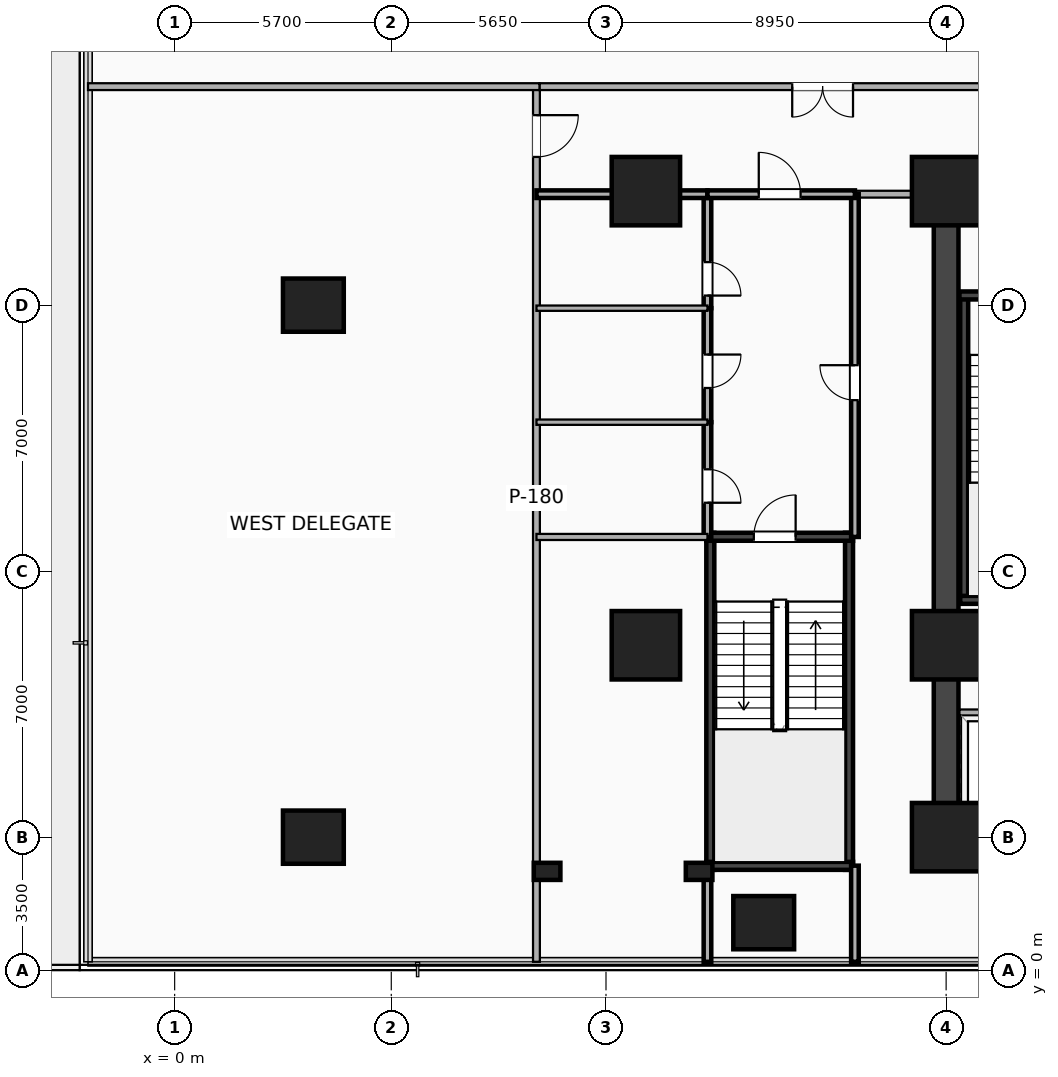
"""IFC4 building model, lengths in metres.
Left out: names, types, materials, properties, quantities, classifications, styles, units other than length and angle.
Written with IfcOpenShell. Run it as: python <this file> out.ifc"""

import sys

from ifc_helpers import new_model, si_unit, direction, frame, frame_2d, origin, origin_2d, place, context, subcontext, project, spatial, rectangle, extrude, element, fill, save


model = new_model("IFC4")
c1 = context("Model", 3, precision=1e-05, world=origin(), true_north=direction((0.0, 1.0)))
c2 = subcontext(c1, "Body", "Model", "MODEL_VIEW")
j1 = project(units=[si_unit("LENGTHUNIT", "METRE"), si_unit("PLANEANGLEUNIT", "RADIAN")], contexts=[c1])
p1 = place(None, origin())
s1 = spatial("IfcSite", under=j1, at=p1, CompositionType="ELEMENT")
p2 = place(p1, origin())
s2 = spatial("IfcBuilding", under=s1, at=p2, CompositionType="ELEMENT")
p3 = place(p2, frame((0.0, 0.0, 5.4)))
s3 = spatial("IfcBuildingStorey", under=s2, at=p3, CompositionType="ELEMENT", Elevation=5.4)
p4 = place(p3, frame((20.3, 3.63, 0.0), z_axis=(0.0, 0.0, 1.0), x_axis=(1.0, 0.0, 0.0)))
e1 = element("IfcWall", 1, at=p4, inside=s3, PredefinedType="SHEAR", context=c2, shape_type="SweptSolid", body=[
    extrude(rectangle(XDim=24.5, YDim=0.65, at=frame_2d((12.25, 0.0))), origin(), (0.0, 0.0, 1.0), 4.3),
])
p5 = place(p3, frame((20.3, 3.5, 0.0), z_axis=(0.0, 0.0, 1.0), x_axis=(0.0, 1.0, 0.0)))
e2 = element("IfcWall", 2, at=p5, inside=s3, PredefinedType="SHEAR", context=c2, shape_type="SweptSolid", body=[
    extrude(rectangle(XDim=16.9, YDim=0.65, at=frame_2d((8.45, 0.0))), origin(), (0.0, 0.0, 1.0), 4.3),
])
p6 = place(p3, frame((20.775, 9.745, 0.0), z_axis=(0.0, 0.0, 1.0), x_axis=(0.0, 1.0, 0.0)))
e3 = element("IfcWall", 3, at=p6, inside=s3, PredefinedType="SHEAR", context=c2, shape_type="SweptSolid", body=[
    extrude(rectangle(XDim=8.01, YDim=0.21, at=frame_2d((4.005, 0.0))), origin(), (0.0, 0.0, 1.0), 4.3),
])
p7 = place(p3, frame((20.67, 9.745, 0.0), z_axis=(0.0, 0.0, 1.0), x_axis=(1.0, 0.0, 0.0)))
e4 = element("IfcWall", 4, at=p7, inside=s3, PredefinedType="SHEAR", context=c2, shape_type="SweptSolid", body=[
    extrude(rectangle(XDim=3.66, YDim=0.21, at=frame_2d((1.83, 0.0))), origin(), (0.0, 0.0, 1.0), 4.3),
])
p8 = place(p3, frame((20.65, 17.755, 0.0), z_axis=(0.0, 0.0, 1.0), x_axis=(1.0, 0.0, 0.0)))
e5 = element("IfcWall", 5, at=p8, inside=s3, PredefinedType="SHEAR", context=c2, shape_type="SweptSolid", body=[
    extrude(rectangle(XDim=8.3, YDim=0.21, at=frame_2d((4.15, 0.0))), origin(), (0.0, 0.0, 1.0), 4.3),
])
p9 = place(p8, frame((2.2, 0.0, 0.0), z_axis=(0.0, 0.0, 1.0), x_axis=(-1.0, 0.0, 0.0)))
e6 = element("IfcOpeningElement", 6, at=p9, cuts=e5, PredefinedType="OPENING", context=c2, shape_type="SweptSolid", body=[
    extrude(rectangle(XDim=1.05, YDim=2.15, at=frame_2d((0.525, 1.075))), frame((0.0, 0.115, 0.0), z_axis=(0.0, -1.0, 0.0), x_axis=(1.0, 0.0, 0.0)), (0.0, 0.0, 1.0), 0.23),
])
p10 = place(p8, frame((4.15, 0.0, 0.0)))
e7 = element("IfcOpeningElement", 7, at=p10, cuts=e5, PredefinedType="OPENING", context=c2, shape_type="SweptSolid", body=[
    extrude(rectangle(XDim=1.1, YDim=2.18, at=frame_2d((0.55, 1.09))), frame((0.0, 0.115, 0.0), z_axis=(0.0, -1.0, 0.0), x_axis=(1.0, 0.0, 0.0)), (0.0, 0.0, 1.0), 0.23),
])
p11 = place(p8, frame((6.45, 0.0, 0.0)))
e8 = element("IfcOpeningElement", 8, at=p11, cuts=e5, PredefinedType="OPENING", context=c2, shape_type="SweptSolid", body=[
    extrude(rectangle(XDim=1.12, YDim=2.2, at=frame_2d((0.56, 1.1))), frame((0.0, 0.115, 0.0), z_axis=(0.0, -1.0, 0.0), x_axis=(1.0, 0.0, 0.0)), (0.0, 0.0, 1.0), 0.23),
])
for number, where, z_axis, x_axis in (
    (9, (14.095, 2.64, 0.0), (0.0, 0.0, 1.0), (0.0, 1.0, 0.0)),
    (10, (17.745, 2.64, 0.0), (0.0, 0.0, 1.0), (0.0, 1.0, 0.0)),
):
    element("IfcWall", number, at=place(p3, frame(where, z_axis=z_axis, x_axis=x_axis)), inside=s3, PredefinedType="SHEAR", context=c2, shape_type="SweptSolid", body=[
        extrude(rectangle(XDim=8.87, YDim=0.21, at=frame_2d((4.435, 0.0))), origin(), (0.0, 0.0, 1.0), 4.3),
    ])
p12 = place(p3, frame((13.99, 2.745, 0.0), z_axis=(0.0, 0.0, 1.0), x_axis=(1.0, 0.0, 0.0)))
e11 = element("IfcWall", 11, at=p12, inside=s3, PredefinedType="SHEAR", context=c2, shape_type="SweptSolid", body=[
    extrude(rectangle(XDim=3.86, YDim=0.21, at=frame_2d((1.93, 0.0))), origin(), (0.0, 0.0, 1.0), 4.3),
])
p13 = place(p3, frame((13.99, 11.405, 0.0), z_axis=(0.0, 0.0, 1.0), x_axis=(1.0, 0.0, 0.0)))
e12 = element("IfcWall", 12, at=p13, inside=s3, PredefinedType="SHEAR", context=c2, shape_type="SweptSolid", body=[
    extrude(rectangle(XDim=3.86, YDim=0.21, at=frame_2d((1.93, 0.0))), origin(), (0.0, 0.0, 1.0), 4.3),
])
p14 = place(p13, frame((2.35, 0.0, 0.0), z_axis=(0.0, 0.0, 1.0), x_axis=(-1.0, 0.0, 0.0)))
e13 = element("IfcOpeningElement", 13, at=p14, cuts=e12, PredefinedType="OPENING", context=c2, shape_type="SweptSolid", body=[
    extrude(rectangle(XDim=1.1, YDim=2.15, at=frame_2d((0.55, 1.075))), frame((0.0, 0.115, 0.0), z_axis=(0.0, -1.0, 0.0), x_axis=(1.0, 0.0, 0.0)), (0.0, 0.0, 1.0), 0.23),
])
for number, where, z_axis, x_axis in (
    (14, (9.8, 2.6, -0.3), (0.0, 0.0, 1.0), (1.0, 0.0, 0.0)),
    (15, (13.8, 2.6, -0.3), (0.0, 0.0, 1.0), (1.0, 0.0, 0.0)),
):
    element("IfcColumn", number, at=place(p3, frame(where, z_axis=z_axis, x_axis=x_axis)), inside=s3, PredefinedType="PILASTER", context=c2, shape_type="SweptSolid", body=[
        extrude(rectangle(XDim=0.7, YDim=0.45, at=origin_2d()), origin(), (0.0, 0.0, 1.0), 4.6),
    ])
for number, where, z_axis, x_axis in (
    (16, (20.3, 3.5, -0.3), (0.0, 0.0, 1.0), (1.0, 0.0, 0.0)),
    (17, (20.3, 8.55, -0.3), (0.0, 0.0, 1.0), (1.0, 0.0, 0.0)),
    (18, (20.3, 20.5, -0.3), (0.0, 0.0, 1.0), (1.0, 0.0, 0.0)),
    (19, (12.4, 8.55, -0.3), (0.0, 0.0, 1.0), (1.0, 0.0, 0.0)),
    (20, (12.4, 20.5, -0.3), (0.0, 0.0, 1.0), (1.0, 0.0, 0.0)),
):
    element("IfcColumn", number, at=place(p3, frame(where, z_axis=z_axis, x_axis=x_axis)), inside=s3, PredefinedType="COLUMN", context=c2, shape_type="SweptSolid", body=[
        extrude(rectangle(XDim=1.8, YDim=1.8, at=origin_2d()), origin(), (0.0, 0.0, 1.0), 4.6),
    ])
for number, where, z_axis, x_axis in (
    (21, (3.65, 3.5, -0.3), (0.0, 0.0, 1.0), (1.0, 0.0, 0.0)),
    (22, (3.65, 17.5, -0.3), (0.0, 0.0, 1.0), (1.0, 0.0, 0.0)),
    (23, (15.5, 1.25, -0.3), (0.0, 0.0, 1.0), (1.0, 0.0, 0.0)),
):
    element("IfcColumn", number, at=place(p3, frame(where, z_axis=z_axis, x_axis=x_axis)), inside=s3, PredefinedType="COLUMN", context=c2, shape_type="SweptSolid", body=[
        extrude(rectangle(XDim=1.6, YDim=1.4, at=origin_2d()), origin(), (0.0, 0.0, 1.0), 4.6),
    ])
p15 = place(p3, frame((20.65, 20.42, 0.0), z_axis=(0.0, 0.0, 1.0), x_axis=(1.0, 0.0, 0.0)))
e24 = element("IfcWall", 24, at=p15, inside=s3, PredefinedType="PARTITIONING", context=c2, shape_type="SweptSolid", body=[
    extrude(rectangle(XDim=5.73, YDim=0.2, at=frame_2d((2.865, 0.0))), origin(), (0.0, 0.0, 1.0), 2.635),
])
p16 = place(p15, frame((2.3, 0.0, 0.0)))
e25 = element("IfcOpeningElement", 25, at=p16, cuts=e24, PredefinedType="OPENING", context=c2, shape_type="SweptSolid", body=[
    extrude(rectangle(XDim=1.1, YDim=2.15, at=frame_2d((0.55, 1.075))), frame((0.0, 0.11, 0.0), z_axis=(0.0, -1.0, 0.0), x_axis=(1.0, 0.0, 0.0)), (0.0, 0.0, 1.0), 0.22),
])
p17 = place(p3, frame((20.65, 6.78, 0.0), z_axis=(0.0, 0.0, 1.0), x_axis=(1.0, 0.0, 0.0)))
e26 = element("IfcWall", 26, at=p17, inside=s3, PredefinedType="PARTITIONING", context=c2, shape_type="SweptSolid", body=[
    extrude(rectangle(XDim=8.3, YDim=0.16, at=frame_2d((4.15, 0.0))), origin(), (0.0, 0.0, 1.0), 3.43),
])
p18 = place(p17, frame((3.695, 0.0, 0.0)))
e27 = element("IfcOpeningElement", 27, at=p18, cuts=e26, PredefinedType="OPENING", context=c2, shape_type="SweptSolid", body=[
    extrude(rectangle(XDim=1.15, YDim=2.2, at=frame_2d((0.575, 1.1))), frame((0.0, 0.09, 0.0), z_axis=(0.0, -1.0, 0.0), x_axis=(1.0, 0.0, 0.0)), (0.0, 0.0, 1.0), 0.18),
])
p19 = place(p17, frame((5.492, 0.0, 0.0)))
e28 = element("IfcOpeningElement", 28, at=p19, cuts=e26, PredefinedType="OPENING", context=c2, shape_type="SweptSolid", body=[
    extrude(rectangle(XDim=1.15, YDim=2.2, at=frame_2d((0.575, 1.1))), frame((0.0, 0.09, 0.0), z_axis=(0.0, -1.0, 0.0), x_axis=(1.0, 0.0, 0.0)), (0.0, 0.0, 1.0), 0.18),
])
p20 = place(p17, frame((1.059, 0.0, 0.0)))
e29 = element("IfcOpeningElement", 29, at=p20, cuts=e26, PredefinedType="OPENING", context=c2, shape_type="SweptSolid", body=[
    extrude(rectangle(XDim=1.15, YDim=2.2, at=frame_2d((0.575, 1.1))), frame((0.0, 0.09, 0.0), z_axis=(0.0, -1.0, 0.0), x_axis=(1.0, 0.0, 0.0)), (0.0, 0.0, 1.0), 0.18),
])
p21 = place(p3, frame((17.9, 20.42, 0.0), z_axis=(0.0, 0.0, 1.0), x_axis=(1.0, 0.0, 0.0)))
e30 = element("IfcWall", 30, at=p21, inside=s3, PredefinedType="PARTITIONING", context=c2, shape_type="SweptSolid", body=[
    extrude(rectangle(XDim=2.4, YDim=0.18, at=frame_2d((1.2, 0.0))), origin(), (0.0, 0.0, 1.0), 2.635),
])
p22 = place(p3, frame((9.52, 0.22, 0.0), z_axis=(0.0, 0.0, 1.0), x_axis=(0.0, 1.0, 0.0)))
e31 = element("IfcWall", 31, at=p22, inside=s3, PredefinedType="PARTITIONING", context=c2, shape_type="SweptSolid", body=[
    extrude(rectangle(XDim=23.03, YDim=0.18, at=frame_2d((11.515, 0.0))), origin(), (0.0, 0.0, 1.0), 4.3),
])
p23 = place(p22, frame((21.18, 0.0, 0.0)))
e32 = element("IfcOpeningElement", 32, at=p23, cuts=e31, PredefinedType="OPENING", context=c2, shape_type="SweptSolid", body=[
    extrude(rectangle(XDim=1.1, YDim=2.15, at=frame_2d((0.55, 1.075))), frame((0.0, 0.1, 0.0), z_axis=(0.0, -1.0, 0.0), x_axis=(1.0, 0.0, 0.0)), (0.0, 0.0, 1.0), 0.2),
])
p24 = place(p3, frame((14.02, 11.4, 0.0), z_axis=(0.0, 0.0, 1.0), x_axis=(0.0, 1.0, 0.0)))
e33 = element("IfcWall", 33, at=p24, inside=s3, PredefinedType="PARTITIONING", context=c2, shape_type="SweptSolid", body=[
    extrude(rectangle(XDim=3.02, YDim=0.2, at=frame_2d((1.51, 0.0))), origin(), (0.0, 0.0, 1.0), 4.3),
])
p25 = place(p24, frame((0.9, 0.0, 0.0)))
e34 = element("IfcOpeningElement", 34, at=p25, cuts=e33, PredefinedType="OPENING", context=c2, shape_type="SweptSolid", body=[
    extrude(rectangle(XDim=0.88, YDim=2.08, at=frame_2d((0.44, 1.04))), frame((0.0, 0.11, 0.0), z_axis=(0.0, -1.0, 0.0), x_axis=(1.0, 0.0, 0.0)), (0.0, 0.0, 1.0), 0.22),
])
p26 = place(p3, frame((14.02, 14.42, 0.0), z_axis=(0.0, 0.0, 1.0), x_axis=(0.0, 1.0, 0.0)))
e35 = element("IfcWall", 35, at=p26, inside=s3, PredefinedType="PARTITIONING", context=c2, shape_type="SweptSolid", body=[
    extrude(rectangle(XDim=3.0, YDim=0.2, at=frame_2d((1.5, 0.0))), origin(), (0.0, 0.0, 1.0), 4.3),
])
p27 = place(p26, frame((0.9, 0.0, 0.0)))
e36 = element("IfcOpeningElement", 36, at=p27, cuts=e35, PredefinedType="OPENING", context=c2, shape_type="SweptSolid", body=[
    extrude(rectangle(XDim=0.88, YDim=2.08, at=frame_2d((0.44, 1.04))), frame((0.0, 0.11, 0.0), z_axis=(0.0, -1.0, 0.0), x_axis=(1.0, 0.0, 0.0)), (0.0, 0.0, 1.0), 0.22),
])
p28 = place(p3, frame((14.02, 17.42, 0.0), z_axis=(0.0, 0.0, 1.0), x_axis=(0.0, 1.0, 0.0)))
e37 = element("IfcWall", 37, at=p28, inside=s3, PredefinedType="PARTITIONING", context=c2, shape_type="SweptSolid", body=[
    extrude(rectangle(XDim=3.0, YDim=0.2, at=frame_2d((1.5, 0.0))), origin(), (0.0, 0.0, 1.0), 3.373),
])
p29 = place(p28, frame((0.332, 0.0, 0.0)))
e38 = element("IfcOpeningElement", 38, at=p29, cuts=e37, PredefinedType="OPENING", context=c2, shape_type="SweptSolid", body=[
    extrude(rectangle(XDim=0.88, YDim=2.08, at=frame_2d((0.44, 1.04))), frame((0.0, 0.11, 0.0), z_axis=(0.0, -1.0, 0.0), x_axis=(1.0, 0.0, 0.0)), (0.0, 0.0, 1.0), 0.22),
])
p30 = place(p3, frame((14.02, 0.22, 0.0), z_axis=(0.0, 0.0, 1.0), x_axis=(0.0, 1.0, 0.0)))
e39 = element("IfcWall", 39, at=p30, inside=s3, PredefinedType="PARTITIONING", context=c2, shape_type="SweptSolid", body=[
    extrude(rectangle(XDim=2.53, YDim=0.2, at=frame_2d((1.265, 0.0))), origin(), (0.0, 0.0, 1.0), 4.3),
])
for number, where, z_axis, x_axis in (
    (40, (9.52, 14.42, 0.0), (0.0, 0.0, 1.0), (1.0, 0.0, 0.0)),
    (41, (9.52, 17.42, 0.0), (0.0, 0.0, 1.0), (1.0, 0.0, 0.0)),
):
    element("IfcWall", number, at=place(p3, frame(where, z_axis=z_axis, x_axis=x_axis)), inside=s3, PredefinedType="PARTITIONING", context=c2, shape_type="SweptSolid", body=[
        extrude(rectangle(XDim=4.5, YDim=0.14, at=frame_2d((2.25, 0.0))), origin(), (0.0, 0.0, 1.0), 3.43),
    ])
p31 = place(p3, frame((9.52, 11.4, 0.0), z_axis=(0.0, 0.0, 1.0), x_axis=(1.0, 0.0, 0.0)))
e42 = element("IfcWall", 42, at=p31, inside=s3, PredefinedType="PARTITIONING", context=c2, shape_type="SweptSolid", body=[
    extrude(rectangle(XDim=4.5, YDim=0.16, at=frame_2d((2.25, 0.0))), origin(), (0.0, 0.0, 1.0), 3.43),
])
p32 = place(p3, frame((17.9, 11.4, 0.0), z_axis=(0.0, 0.0, 1.0), x_axis=(0.0, 1.0, 0.0)))
e43 = element("IfcWall", 43, at=p32, inside=s3, PredefinedType="PARTITIONING", context=c2, shape_type="SweptSolid", body=[
    extrude(rectangle(XDim=9.02, YDim=0.2, at=frame_2d((4.51, 0.0))), origin(), (0.0, 0.0, 1.0), 3.373),
])
p33 = place(p32, frame((4.52, 0.0, 0.0), z_axis=(0.0, 0.0, 1.0), x_axis=(-1.0, 0.0, 0.0)))
e44 = element("IfcOpeningElement", 44, at=p33, cuts=e43, PredefinedType="OPENING", context=c2, shape_type="SweptSolid", body=[
    extrude(rectangle(XDim=0.92, YDim=2.08, at=frame_2d((0.46, 1.04))), frame((0.0, 0.11, 0.0), z_axis=(0.0, -1.0, 0.0), x_axis=(1.0, 0.0, 0.0)), (0.0, 0.0, 1.0), 0.22),
])
p34 = place(p3, frame((17.9, 0.22, 0.0), z_axis=(0.0, 0.0, 1.0), x_axis=(0.0, 1.0, 0.0)))
e45 = element("IfcWall", 45, at=p34, inside=s3, PredefinedType="PARTITIONING", context=c2, shape_type="SweptSolid", body=[
    extrude(rectangle(XDim=2.53, YDim=0.2, at=frame_2d((1.265, 0.0))), origin(), (0.0, 0.0, 1.0), 3.373),
])
p35 = place(p3, frame((9.52, 20.42, 0.0), z_axis=(0.0, 0.0, 1.0), x_axis=(1.0, 0.0, 0.0)))
e46 = element("IfcWall", 46, at=p35, inside=s3, PredefinedType="PARTITIONING", context=c2, shape_type="SweptSolid", body=[
    extrude(rectangle(XDim=4.5, YDim=0.2, at=frame_2d((2.25, 0.0))), origin(), (0.0, 0.0, 1.0), 3.373),
])
p36 = place(p3, frame((14.02, 20.42, 0.0), z_axis=(0.0, 0.0, 1.0), x_axis=(1.0, 0.0, 0.0)))
e47 = element("IfcWall", 47, at=p36, inside=s3, PredefinedType="PARTITIONING", context=c2, shape_type="SweptSolid", body=[
    extrude(rectangle(XDim=3.88, YDim=0.2, at=frame_2d((1.94, 0.0))), origin(), (0.0, 0.0, 1.0), 3.373),
])
p37 = place(p36, frame((2.45, 0.0, 0.0), z_axis=(0.0, 0.0, 1.0), x_axis=(-1.0, 0.0, 0.0)))
e48 = element("IfcOpeningElement", 48, at=p37, cuts=e47, PredefinedType="OPENING", context=c2, shape_type="SweptSolid", body=[
    extrude(rectangle(XDim=1.1, YDim=2.15, at=frame_2d((0.55, 1.075))), frame((0.0, 0.11, 0.0), z_axis=(0.0, -1.0, 0.0), x_axis=(1.0, 0.0, 0.0)), (0.0, 0.0, 1.0), 0.22),
])
p38 = place(p3, frame((9.6, 23.25, 0.0), z_axis=(0.0, 0.0, 1.0), x_axis=(1.0, 0.0, 0.0)))
e49 = element("IfcWall", 49, at=p38, inside=s3, PredefinedType="PARTITIONING", context=c2, shape_type="SweptSolid", body=[
    extrude(rectangle(XDim=14.9, YDim=0.18, at=frame_2d((7.45, 0.0))), origin(), (0.0, 0.0, 1.0), 3.43),
])
p39 = place(p38, frame((6.65, 0.0, 0.0)))
e50 = element("IfcOpeningElement", 50, at=p39, cuts=e49, PredefinedType="OPENING", context=c2, shape_type="SweptSolid", body=[
    extrude(rectangle(XDim=1.6, YDim=2.22, at=frame_2d((0.8, 1.11))), frame((0.0, 0.1, 0.0), z_axis=(0.0, -1.0, 0.0), x_axis=(1.0, 0.0, 0.0)), (0.0, 0.0, 1.0), 0.2),
])
p40 = place(p3, frame((-2.28, 23.25, 0.0), z_axis=(0.0, 0.0, 1.0), x_axis=(1.0, 0.0, 0.0)))
e51 = element("IfcWall", 51, at=p40, inside=s3, PredefinedType="PARTITIONING", context=c2, shape_type="SweptSolid", body=[
    extrude(rectangle(XDim=11.88, YDim=0.18, at=frame_2d((5.94, 0.0))), origin(), (0.0, 0.0, 1.0), 3.43),
])
p41 = place(p14, origin())
e52 = element("IfcDoor", 52, at=p41, inside=s3, OperationType="SINGLE_SWING_RIGHT", PredefinedType="DOOR", context=c2, shape_type="SweptSolid", body=[
    extrude(rectangle(XDim=1.1, YDim=2.15, at=frame_2d((0.55, 1.075))), frame((0.0, 0.025, 0.0), z_axis=(0.0, -1.0, 0.0), x_axis=(1.0, 0.0, 0.0)), (0.0, 0.0, 1.0), 0.05),
])
fill(e13, e52)
p42 = place(p23, origin())
e53 = element("IfcDoor", 53, at=p42, inside=s3, OperationType="SINGLE_SWING_RIGHT", PredefinedType="DOOR", context=c2, shape_type="SweptSolid", body=[
    extrude(rectangle(XDim=1.1, YDim=2.15, at=frame_2d((0.55, 1.075))), frame((0.0, 0.025, 0.0), z_axis=(0.0, -1.0, 0.0), x_axis=(1.0, 0.0, 0.0)), (0.0, 0.0, 1.0), 0.05),
])
fill(e32, e53)
p43 = place(p25, origin())
e54 = element("IfcDoor", 54, at=p43, inside=s3, OperationType="SINGLE_SWING_LEFT", PredefinedType="DOOR", context=c2, shape_type="SweptSolid", body=[
    extrude(rectangle(XDim=0.88, YDim=2.08, at=frame_2d((0.44, 1.04))), frame((0.0, 0.025, 0.0), z_axis=(0.0, -1.0, 0.0), x_axis=(1.0, 0.0, 0.0)), (0.0, 0.0, 1.0), 0.05),
])
fill(e34, e54)
p44 = place(p27, origin())
e55 = element("IfcDoor", 55, at=p44, inside=s3, OperationType="SINGLE_SWING_RIGHT", PredefinedType="DOOR", context=c2, shape_type="SweptSolid", body=[
    extrude(rectangle(XDim=0.88, YDim=2.08, at=frame_2d((0.44, 1.04))), frame((0.0, 0.025, 0.0), z_axis=(0.0, -1.0, 0.0), x_axis=(1.0, 0.0, 0.0)), (0.0, 0.0, 1.0), 0.05),
])
fill(e36, e55)
p45 = place(p29, origin())
e56 = element("IfcDoor", 56, at=p45, inside=s3, OperationType="SINGLE_SWING_LEFT", PredefinedType="DOOR", context=c2, shape_type="SweptSolid", body=[
    extrude(rectangle(XDim=0.88, YDim=2.08, at=frame_2d((0.44, 1.04))), frame((0.0, 0.025, 0.0), z_axis=(0.0, -1.0, 0.0), x_axis=(1.0, 0.0, 0.0)), (0.0, 0.0, 1.0), 0.05),
])
fill(e38, e56)
p46 = place(p33, origin())
e57 = element("IfcDoor", 57, at=p46, inside=s3, OperationType="SINGLE_SWING_RIGHT", PredefinedType="DOOR", context=c2, shape_type="SweptSolid", body=[
    extrude(rectangle(XDim=0.92, YDim=2.08, at=frame_2d((0.46, 1.04))), frame((0.0, 0.025, 0.0), z_axis=(0.0, -1.0, 0.0), x_axis=(1.0, 0.0, 0.0)), (0.0, 0.0, 1.0), 0.05),
])
fill(e44, e57)
p47 = place(p37, origin())
e58 = element("IfcDoor", 58, at=p47, inside=s3, OperationType="SINGLE_SWING_LEFT", PredefinedType="DOOR", context=c2, shape_type="SweptSolid", body=[
    extrude(rectangle(XDim=1.1, YDim=2.15, at=frame_2d((0.55, 1.075))), frame((0.0, 0.025, 0.0), z_axis=(0.0, -1.0, 0.0), x_axis=(1.0, 0.0, 0.0)), (0.0, 0.0, 1.0), 0.05),
])
fill(e48, e58)
p48 = place(p39, origin())
e59 = element("IfcDoor", 59, at=p48, inside=s3, OperationType="DOUBLE_DOOR_SINGLE_SWING", PredefinedType="DOOR", context=c2, shape_type="SweptSolid", body=[
    extrude(rectangle(XDim=1.6, YDim=2.22, at=frame_2d((0.8, 1.11))), frame((0.0, 0.025, 0.0), z_axis=(0.0, -1.0, 0.0), x_axis=(1.0, 0.0, 0.0)), (0.0, 0.0, 1.0), 0.05),
])
fill(e50, e59)
save(model, sys.argv[1])
